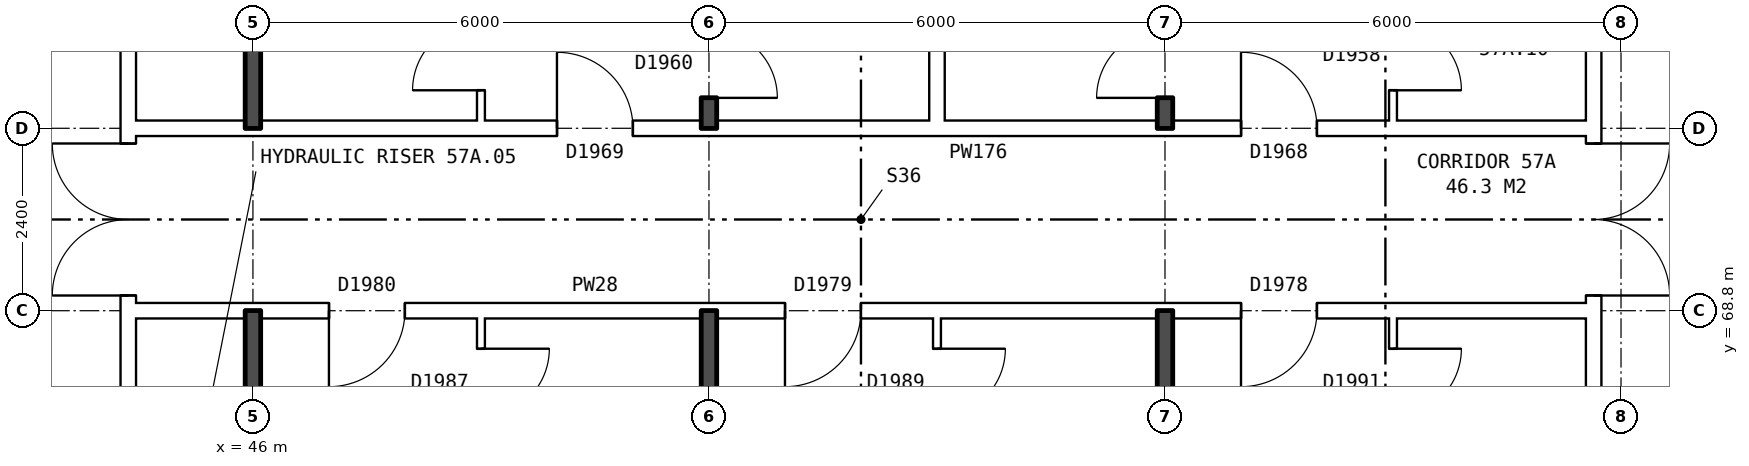
"""IFC4 building model, lengths in metres.
Left out: names, types, materials, properties, quantities, classifications, styles, units other than length and angle.
Written with IfcOpenShell. Run it as: python <this file> out.ifc"""

import sys

from ifc_helpers import new_model, si_unit, direction, frame, frame_2d, origin, place, context, subcontext, project, spatial, rectangle, extrude, element, fill, save


model = new_model("IFC4")
c1 = context("Model", 3, precision=1e-05, world=origin(), true_north=direction((0.0, 1.0)))
c2 = subcontext(c1, "Body", "Model", "MODEL_VIEW")
j1 = project(units=[si_unit("LENGTHUNIT", "METRE"), si_unit("PLANEANGLEUNIT", "RADIAN")], contexts=[c1])
p1 = place(None, origin())
s1 = spatial("IfcSite", under=j1, at=p1, CompositionType="ELEMENT")
p2 = place(p1, origin())
s2 = spatial("IfcBuilding", under=s1, at=p2, CompositionType="ELEMENT")
p3 = place(p2, frame((0.0, 0.0, 202.8)))
s3 = spatial("IfcBuildingStorey", under=s2, at=p3, CompositionType="ELEMENT", Elevation=202.8)
p4 = place(p3, frame((63.64, 63.9, 0.0), z_axis=(0.0, 0.0, 1.0), x_axis=(0.0, 1.0, 0.0)))
e1 = element("IfcWall", 1, at=p4, inside=s3, PredefinedType="PARTITIONING", context=c2, shape_type="SweptSolid", body=[
    extrude(rectangle(XDim=12.2, YDim=0.2, at=frame_2d((6.1, 0.0))), origin(), (0.0, 0.0, 1.0), 2.85),
])
p5 = place(p4, frame((5.1, 0.0, 0.0)))
e2 = element("IfcOpeningElement", 2, at=p5, cuts=e1, PredefinedType="OPENING", context=c2, shape_type="SweptSolid", body=[
    extrude(rectangle(XDim=2.0, YDim=2.1, at=frame_2d((1.0, 1.05))), frame((0.0, 0.11, 0.0), z_axis=(0.0, -1.0, 0.0), x_axis=(1.0, 0.0, 0.0)), (0.0, 0.0, 1.0), 0.22),
])
p6 = place(p3, frame((44.36, 63.9, 0.0), z_axis=(0.0, 0.0, 1.0), x_axis=(0.0, 1.0, 0.0)))
e3 = element("IfcWall", 3, at=p6, inside=s3, PredefinedType="PARTITIONING", context=c2, shape_type="SweptSolid", body=[
    extrude(rectangle(XDim=12.2, YDim=0.2, at=frame_2d((6.1, 0.0))), origin(), (0.0, 0.0, 1.0), 2.85),
])
p7 = place(p6, frame((5.1, 0.0, 0.0)))
e4 = element("IfcOpeningElement", 4, at=p7, cuts=e3, PredefinedType="OPENING", context=c2, shape_type="SweptSolid", body=[
    extrude(rectangle(XDim=2.0, YDim=2.1, at=frame_2d((1.0, 1.05))), frame((0.0, 0.11, 0.0), z_axis=(0.0, -1.0, 0.0), x_axis=(1.0, 0.0, 0.0)), (0.0, 0.0, 1.0), 0.22),
])
p8 = place(p3, frame((44.36, 68.8, 0.0), z_axis=(0.0, 0.0, 1.0), x_axis=(1.0, 0.0, 0.0)))
e5 = element("IfcWall", 5, at=p8, inside=s3, PredefinedType="PARTITIONING", context=c2, shape_type="SweptSolid", body=[
    extrude(rectangle(XDim=19.28, YDim=0.2, at=frame_2d((9.64, 0.0))), origin(), (0.0, 0.0, 1.0), 2.85),
])
p9 = place(p8, frame((14.64, 0.0, 0.0)))
e6 = element("IfcOpeningElement", 6, at=p9, cuts=e5, PredefinedType="OPENING", context=c2, shape_type="SweptSolid", body=[
    extrude(rectangle(XDim=1.0, YDim=2.1, at=frame_2d((0.5, 1.05))), frame((0.0, 0.11, 0.0), z_axis=(0.0, -1.0, 0.0), x_axis=(1.0, 0.0, 0.0)), (0.0, 0.0, 1.0), 0.22),
])
p10 = place(p8, frame((8.64, 0.0, 0.0)))
e7 = element("IfcOpeningElement", 7, at=p10, cuts=e5, PredefinedType="OPENING", context=c2, shape_type="SweptSolid", body=[
    extrude(rectangle(XDim=1.0, YDim=2.1, at=frame_2d((0.5, 1.05))), frame((0.0, 0.11, 0.0), z_axis=(0.0, -1.0, 0.0), x_axis=(1.0, 0.0, 0.0)), (0.0, 0.0, 1.0), 0.22),
])
p11 = place(p8, frame((2.64, 0.0, 0.0)))
e8 = element("IfcOpeningElement", 8, at=p11, cuts=e5, PredefinedType="OPENING", context=c2, shape_type="SweptSolid", body=[
    extrude(rectangle(XDim=1.0, YDim=2.1, at=frame_2d((0.5, 1.05))), frame((0.0, 0.11, 0.0), z_axis=(0.0, -1.0, 0.0), x_axis=(1.0, 0.0, 0.0)), (0.0, 0.0, 1.0), 0.22),
])
p12 = place(p3, frame((44.36, 71.2, 0.0), z_axis=(0.0, 0.0, 1.0), x_axis=(1.0, 0.0, 0.0)))
e9 = element("IfcWall", 9, at=p12, inside=s3, PredefinedType="PARTITIONING", context=c2, shape_type="SweptSolid", body=[
    extrude(rectangle(XDim=19.28, YDim=0.2, at=frame_2d((9.64, 0.0))), origin(), (0.0, 0.0, 1.0), 2.85),
])
p13 = place(p12, frame((14.64, 0.0, 0.0)))
e10 = element("IfcOpeningElement", 10, at=p13, cuts=e9, PredefinedType="OPENING", context=c2, shape_type="SweptSolid", body=[
    extrude(rectangle(XDim=1.0, YDim=2.1, at=frame_2d((0.5, 1.05))), frame((0.0, 0.11, 0.0), z_axis=(0.0, -1.0, 0.0), x_axis=(1.0, 0.0, 0.0)), (0.0, 0.0, 1.0), 0.22),
])
p14 = place(p12, frame((5.64, 0.0, 0.0)))
e11 = element("IfcOpeningElement", 11, at=p14, cuts=e9, PredefinedType="OPENING", context=c2, shape_type="SweptSolid", body=[
    extrude(rectangle(XDim=1.0, YDim=2.1, at=frame_2d((0.5, 1.05))), frame((0.0, 0.11, 0.0), z_axis=(0.0, -1.0, 0.0), x_axis=(1.0, 0.0, 0.0)), (0.0, 0.0, 1.0), 0.22),
])
for number, where, z_axis, x_axis in (
    (12, (46.0, 54.36, 0.0), (0.0, 0.0, 1.0), (0.0, 1.0, 0.0)),
    (13, (46.0, 71.2, 0.0), (0.0, 0.0, 1.0), (0.0, 1.0, 0.0)),
):
    element("IfcWall", number, at=place(p3, frame(where, z_axis=z_axis, x_axis=x_axis)), inside=s3, PredefinedType="SOLIDWALL", context=c2, shape_type="SweptSolid", body=[
        extrude(rectangle(XDim=14.44, YDim=0.2, at=frame_2d((7.22, 0.0))), origin(), (0.0, 0.0, 1.0), 2.85),
    ])
p15 = place(p3, frame((49.0, 54.36, 0.0), z_axis=(0.0, 0.0, 1.0), x_axis=(0.0, 1.0, 0.0)))
e14 = element("IfcWall", 14, at=p15, inside=s3, PredefinedType="PARTITIONING", context=c2, shape_type="SweptSolid", body=[
    extrude(rectangle(XDim=14.34, YDim=0.1, at=frame_2d((7.17, 0.0))), origin(), (0.0, 0.0, 1.0), 2.85),
])
p16 = place(p15, frame((4.2, 0.0, 0.0)))
e15 = element("IfcOpeningElement", 15, at=p16, cuts=e14, PredefinedType="OPENING", context=c2, shape_type="SweptSolid", body=[
    extrude(rectangle(XDim=0.9, YDim=2.1, at=frame_2d((0.45, 1.05))), frame((0.0, 0.06, 0.0), z_axis=(0.0, -1.0, 0.0), x_axis=(1.0, 0.0, 0.0)), (0.0, 0.0, 1.0), 0.12),
])
p17 = place(p15, frame((13.04, 0.0, 0.0)))
e16 = element("IfcOpeningElement", 16, at=p17, cuts=e14, PredefinedType="OPENING", context=c2, shape_type="SweptSolid", body=[
    extrude(rectangle(XDim=0.9, YDim=2.1, at=frame_2d((0.45, 1.05))), frame((0.0, 0.06, 0.0), z_axis=(0.0, -1.0, 0.0), x_axis=(1.0, 0.0, 0.0)), (0.0, 0.0, 1.0), 0.12),
])
p18 = place(p3, frame((49.0, 71.3, 0.0), z_axis=(0.0, 0.0, 1.0), x_axis=(0.0, 1.0, 0.0)))
e17 = element("IfcWall", 17, at=p18, inside=s3, PredefinedType="PARTITIONING", context=c2, shape_type="SweptSolid", body=[
    extrude(rectangle(XDim=14.34, YDim=0.1, at=frame_2d((7.17, 0.0))), origin(), (0.0, 0.0, 1.0), 2.85),
])
p19 = place(p18, frame((7.94, 0.0, 0.0)))
e18 = element("IfcOpeningElement", 18, at=p19, cuts=e17, PredefinedType="OPENING", context=c2, shape_type="SweptSolid", body=[
    extrude(rectangle(XDim=0.9, YDim=2.1, at=frame_2d((0.45, 1.05))), frame((0.0, 0.06, 0.0), z_axis=(0.0, -1.0, 0.0), x_axis=(1.0, 0.0, 0.0)), (0.0, 0.0, 1.0), 0.12),
])
p20 = place(p18, frame((0.4, 0.0, 0.0)))
e19 = element("IfcOpeningElement", 19, at=p20, cuts=e17, PredefinedType="OPENING", context=c2, shape_type="SweptSolid", body=[
    extrude(rectangle(XDim=0.9, YDim=2.1, at=frame_2d((0.45, 1.05))), frame((0.0, 0.06, 0.0), z_axis=(0.0, -1.0, 0.0), x_axis=(1.0, 0.0, 0.0)), (0.0, 0.0, 1.0), 0.12),
])
p21 = place(p3, frame((52.0, 54.36, 0.0), z_axis=(0.0, 0.0, 1.0), x_axis=(0.0, 1.0, 0.0)))
e20 = element("IfcWall", 20, at=p21, inside=s3, PredefinedType="SOLIDWALL", context=c2, shape_type="SweptSolid", body=[
    extrude(rectangle(XDim=14.44, YDim=0.2, at=frame_2d((7.22, 0.0))), origin(), (0.0, 0.0, 1.0), 2.85),
])
p22 = place(p3, frame((52.0, 71.2, 0.0), z_axis=(0.0, 0.0, 1.0), x_axis=(0.0, 1.0, 0.0)))
e21 = element("IfcWall", 21, at=p22, inside=s3, PredefinedType="SOLIDWALL", context=c2, shape_type="SweptSolid", body=[
    extrude(rectangle(XDim=14.44, YDim=0.2, at=frame_2d((7.22, 0.0))), origin(), (0.0, 0.0, 1.0), 2.85),
])
p23 = place(p22, frame((8.04, 0.0, 0.0)))
e22 = element("IfcOpeningElement", 22, at=p23, cuts=e21, PredefinedType="OPENING", context=c2, shape_type="SweptSolid", body=[
    extrude(rectangle(XDim=0.9, YDim=2.1, at=frame_2d((0.45, 1.05))), frame((0.0, 0.11, 0.0), z_axis=(0.0, -1.0, 0.0), x_axis=(1.0, 0.0, 0.0)), (0.0, 0.0, 1.0), 0.22),
])
p24 = place(p22, frame((0.4, 0.0, 0.0)))
e23 = element("IfcOpeningElement", 23, at=p24, cuts=e21, PredefinedType="OPENING", context=c2, shape_type="SweptSolid", body=[
    extrude(rectangle(XDim=0.9, YDim=2.1, at=frame_2d((0.45, 1.05))), frame((0.0, 0.11, 0.0), z_axis=(0.0, -1.0, 0.0), x_axis=(1.0, 0.0, 0.0)), (0.0, 0.0, 1.0), 0.22),
])
p25 = place(p3, frame((55.0, 54.36, 0.0), z_axis=(0.0, 0.0, 1.0), x_axis=(0.0, 1.0, 0.0)))
e24 = element("IfcWall", 24, at=p25, inside=s3, PredefinedType="PARTITIONING", context=c2, shape_type="SweptSolid", body=[
    extrude(rectangle(XDim=14.34, YDim=0.1, at=frame_2d((7.17, 0.0))), origin(), (0.0, 0.0, 1.0), 2.85),
])
p26 = place(p25, frame((7.7, 0.0, 0.0)))
e25 = element("IfcOpeningElement", 25, at=p26, cuts=e24, PredefinedType="OPENING", context=c2, shape_type="SweptSolid", body=[
    extrude(rectangle(XDim=0.9, YDim=2.1, at=frame_2d((0.45, 1.05))), frame((0.0, 0.06, 0.0), z_axis=(0.0, -1.0, 0.0), x_axis=(1.0, 0.0, 0.0)), (0.0, 0.0, 1.0), 0.12),
])
p27 = place(p25, frame((13.04, 0.0, 0.0)))
e26 = element("IfcOpeningElement", 26, at=p27, cuts=e24, PredefinedType="OPENING", context=c2, shape_type="SweptSolid", body=[
    extrude(rectangle(XDim=0.9, YDim=2.1, at=frame_2d((0.45, 1.05))), frame((0.0, 0.06, 0.0), z_axis=(0.0, -1.0, 0.0), x_axis=(1.0, 0.0, 0.0)), (0.0, 0.0, 1.0), 0.12),
])
p28 = place(p3, frame((55.0, 71.3, 0.0), z_axis=(0.0, 0.0, 1.0), x_axis=(0.0, 1.0, 0.0)))
e27 = element("IfcWall", 27, at=p28, inside=s3, PredefinedType="PARTITIONING", context=c2, shape_type="SweptSolid", body=[
    extrude(rectangle(XDim=14.34, YDim=0.2, at=frame_2d((7.17, 0.0))), origin(), (0.0, 0.0, 1.0), 2.85),
])
p29 = place(p3, frame((58.0, 54.36, 0.0), z_axis=(0.0, 0.0, 1.0), x_axis=(0.0, 1.0, 0.0)))
e28 = element("IfcWall", 28, at=p29, inside=s3, PredefinedType="SOLIDWALL", context=c2, shape_type="SweptSolid", body=[
    extrude(rectangle(XDim=14.44, YDim=0.2, at=frame_2d((7.22, 0.0))), origin(), (0.0, 0.0, 1.0), 2.85),
])
p30 = place(p3, frame((58.0, 71.2, 0.0), z_axis=(0.0, 0.0, 1.0), x_axis=(0.0, 1.0, 0.0)))
e29 = element("IfcWall", 29, at=p30, inside=s3, PredefinedType="SOLIDWALL", context=c2, shape_type="SweptSolid", body=[
    extrude(rectangle(XDim=14.44, YDim=0.2, at=frame_2d((7.22, 0.0))), origin(), (0.0, 0.0, 1.0), 2.85),
])
p31 = place(p30, frame((8.04, 0.0, 0.0)))
e30 = element("IfcOpeningElement", 30, at=p31, cuts=e29, PredefinedType="OPENING", context=c2, shape_type="SweptSolid", body=[
    extrude(rectangle(XDim=0.9, YDim=2.1, at=frame_2d((0.45, 1.05))), frame((0.0, 0.11, 0.0), z_axis=(0.0, -1.0, 0.0), x_axis=(1.0, 0.0, 0.0)), (0.0, 0.0, 1.0), 0.22),
])
p32 = place(p30, frame((0.4, 0.0, 0.0)))
e31 = element("IfcOpeningElement", 31, at=p32, cuts=e29, PredefinedType="OPENING", context=c2, shape_type="SweptSolid", body=[
    extrude(rectangle(XDim=0.9, YDim=2.1, at=frame_2d((0.45, 1.05))), frame((0.0, 0.11, 0.0), z_axis=(0.0, -1.0, 0.0), x_axis=(1.0, 0.0, 0.0)), (0.0, 0.0, 1.0), 0.22),
])
p33 = place(p3, frame((61.0, 54.36, 0.0), z_axis=(0.0, 0.0, 1.0), x_axis=(0.0, 1.0, 0.0)))
e32 = element("IfcWall", 32, at=p33, inside=s3, PredefinedType="PARTITIONING", context=c2, shape_type="SweptSolid", body=[
    extrude(rectangle(XDim=14.34, YDim=0.1, at=frame_2d((7.17, 0.0))), origin(), (0.0, 0.0, 1.0), 2.85),
])
p34 = place(p33, frame((7.7, 0.0, 0.0)))
e33 = element("IfcOpeningElement", 33, at=p34, cuts=e32, PredefinedType="OPENING", context=c2, shape_type="SweptSolid", body=[
    extrude(rectangle(XDim=0.9, YDim=2.1, at=frame_2d((0.45, 1.05))), frame((0.0, 0.06, 0.0), z_axis=(0.0, -1.0, 0.0), x_axis=(1.0, 0.0, 0.0)), (0.0, 0.0, 1.0), 0.12),
])
p35 = place(p33, frame((13.04, 0.0, 0.0)))
e34 = element("IfcOpeningElement", 34, at=p35, cuts=e32, PredefinedType="OPENING", context=c2, shape_type="SweptSolid", body=[
    extrude(rectangle(XDim=0.9, YDim=2.1, at=frame_2d((0.45, 1.05))), frame((0.0, 0.06, 0.0), z_axis=(0.0, -1.0, 0.0), x_axis=(1.0, 0.0, 0.0)), (0.0, 0.0, 1.0), 0.12),
])
p36 = place(p3, frame((61.0, 71.3, 0.0), z_axis=(0.0, 0.0, 1.0), x_axis=(0.0, 1.0, 0.0)))
e35 = element("IfcWall", 35, at=p36, inside=s3, PredefinedType="PARTITIONING", context=c2, shape_type="SweptSolid", body=[
    extrude(rectangle(XDim=14.34, YDim=0.1, at=frame_2d((7.17, 0.0))), origin(), (0.0, 0.0, 1.0), 2.85),
])
p37 = place(p36, frame((7.94, 0.0, 0.0)))
e36 = element("IfcOpeningElement", 36, at=p37, cuts=e35, PredefinedType="OPENING", context=c2, shape_type="SweptSolid", body=[
    extrude(rectangle(XDim=0.9, YDim=2.1, at=frame_2d((0.45, 1.05))), frame((0.0, 0.06, 0.0), z_axis=(0.0, -1.0, 0.0), x_axis=(1.0, 0.0, 0.0)), (0.0, 0.0, 1.0), 0.12),
])
p38 = place(p36, frame((0.4, 0.0, 0.0)))
e37 = element("IfcOpeningElement", 37, at=p38, cuts=e35, PredefinedType="OPENING", context=c2, shape_type="SweptSolid", body=[
    extrude(rectangle(XDim=0.9, YDim=2.1, at=frame_2d((0.45, 1.05))), frame((0.0, 0.06, 0.0), z_axis=(0.0, -1.0, 0.0), x_axis=(1.0, 0.0, 0.0)), (0.0, 0.0, 1.0), 0.12),
])
p39 = place(p5, frame((2.0, 0.0, 0.0), z_axis=(0.0, 0.0, 1.0), x_axis=(-1.0, 0.0, 0.0)))
e38 = element("IfcDoor", 38, at=p39, inside=s3, OperationType="DOUBLE_DOOR_SINGLE_SWING", PredefinedType="DOOR", context=c2, shape_type="SweptSolid", body=[
    extrude(rectangle(XDim=2.0, YDim=2.1, at=frame_2d((1.0, 1.05))), frame((0.0, 0.025, 0.0), z_axis=(0.0, -1.0, 0.0), x_axis=(1.0, 0.0, 0.0)), (0.0, 0.0, 1.0), 0.05),
])
fill(e2, e38)
p40 = place(p7, origin())
e39 = element("IfcDoor", 39, at=p40, inside=s3, OperationType="DOUBLE_DOOR_SINGLE_SWING", PredefinedType="DOOR", context=c2, shape_type="SweptSolid", body=[
    extrude(rectangle(XDim=2.0, YDim=2.1, at=frame_2d((1.0, 1.05))), frame((0.0, 0.025, 0.0), z_axis=(0.0, -1.0, 0.0), x_axis=(1.0, 0.0, 0.0)), (0.0, 0.0, 1.0), 0.05),
])
fill(e4, e39)
p41 = place(p9, frame((1.0, 0.0, 0.0), z_axis=(0.0, 0.0, 1.0), x_axis=(-1.0, 0.0, 0.0)))
e40 = element("IfcDoor", 40, at=p41, inside=s3, OperationType="SINGLE_SWING_RIGHT", PredefinedType="DOOR", context=c2, shape_type="SweptSolid", body=[
    extrude(rectangle(XDim=1.0, YDim=2.1, at=frame_2d((0.5, 1.05))), frame((0.0, 0.025, 0.0), z_axis=(0.0, -1.0, 0.0), x_axis=(1.0, 0.0, 0.0)), (0.0, 0.0, 1.0), 0.05),
])
fill(e6, e40)
p42 = place(p35, frame((0.9, 0.0, 0.0), z_axis=(0.0, 0.0, 1.0), x_axis=(-1.0, 0.0, 0.0)))
e41 = element("IfcDoor", 41, at=p42, inside=s3, OperationType="SINGLE_SWING_LEFT", PredefinedType="DOOR", context=c2, shape_type="SweptSolid", body=[
    extrude(rectangle(XDim=0.9, YDim=2.1, at=frame_2d((0.45, 1.05))), frame((0.0, 0.025, 0.0), z_axis=(0.0, -1.0, 0.0), x_axis=(1.0, 0.0, 0.0)), (0.0, 0.0, 1.0), 0.05),
])
fill(e34, e41)
p43 = place(p10, frame((1.0, 0.0, 0.0), z_axis=(0.0, 0.0, 1.0), x_axis=(-1.0, 0.0, 0.0)))
e42 = element("IfcDoor", 42, at=p43, inside=s3, OperationType="SINGLE_SWING_RIGHT", PredefinedType="DOOR", context=c2, shape_type="SweptSolid", body=[
    extrude(rectangle(XDim=1.0, YDim=2.1, at=frame_2d((0.5, 1.05))), frame((0.0, 0.025, 0.0), z_axis=(0.0, -1.0, 0.0), x_axis=(1.0, 0.0, 0.0)), (0.0, 0.0, 1.0), 0.05),
])
fill(e7, e42)
p44 = place(p27, frame((0.9, 0.0, 0.0), z_axis=(0.0, 0.0, 1.0), x_axis=(-1.0, 0.0, 0.0)))
e43 = element("IfcDoor", 43, at=p44, inside=s3, OperationType="SINGLE_SWING_LEFT", PredefinedType="DOOR", context=c2, shape_type="SweptSolid", body=[
    extrude(rectangle(XDim=0.9, YDim=2.1, at=frame_2d((0.45, 1.05))), frame((0.0, 0.025, 0.0), z_axis=(0.0, -1.0, 0.0), x_axis=(1.0, 0.0, 0.0)), (0.0, 0.0, 1.0), 0.05),
])
fill(e26, e43)
p45 = place(p11, frame((1.0, 0.0, 0.0), z_axis=(0.0, 0.0, 1.0), x_axis=(-1.0, 0.0, 0.0)))
e44 = element("IfcDoor", 44, at=p45, inside=s3, OperationType="SINGLE_SWING_RIGHT", PredefinedType="DOOR", context=c2, shape_type="SweptSolid", body=[
    extrude(rectangle(XDim=1.0, YDim=2.1, at=frame_2d((0.5, 1.05))), frame((0.0, 0.025, 0.0), z_axis=(0.0, -1.0, 0.0), x_axis=(1.0, 0.0, 0.0)), (0.0, 0.0, 1.0), 0.05),
])
fill(e8, e44)
p46 = place(p17, frame((0.9, 0.0, 0.0), z_axis=(0.0, 0.0, 1.0), x_axis=(-1.0, 0.0, 0.0)))
e45 = element("IfcDoor", 45, at=p46, inside=s3, OperationType="SINGLE_SWING_LEFT", PredefinedType="DOOR", context=c2, shape_type="SweptSolid", body=[
    extrude(rectangle(XDim=0.9, YDim=2.1, at=frame_2d((0.45, 1.05))), frame((0.0, 0.025, 0.0), z_axis=(0.0, -1.0, 0.0), x_axis=(1.0, 0.0, 0.0)), (0.0, 0.0, 1.0), 0.05),
])
fill(e16, e45)
p47 = place(p13, origin())
e46 = element("IfcDoor", 46, at=p47, inside=s3, OperationType="SINGLE_SWING_LEFT", PredefinedType="DOOR", context=c2, shape_type="SweptSolid", body=[
    extrude(rectangle(XDim=1.0, YDim=2.1, at=frame_2d((0.5, 1.05))), frame((0.0, 0.025, 0.0), z_axis=(0.0, -1.0, 0.0), x_axis=(1.0, 0.0, 0.0)), (0.0, 0.0, 1.0), 0.05),
])
fill(e10, e46)
p48 = place(p38, frame((0.9, 0.0, 0.0), z_axis=(0.0, 0.0, 1.0), x_axis=(-1.0, 0.0, 0.0)))
e47 = element("IfcDoor", 47, at=p48, inside=s3, OperationType="SINGLE_SWING_RIGHT", PredefinedType="DOOR", context=c2, shape_type="SweptSolid", body=[
    extrude(rectangle(XDim=0.9, YDim=2.1, at=frame_2d((0.45, 1.05))), frame((0.0, 0.025, 0.0), z_axis=(0.0, -1.0, 0.0), x_axis=(1.0, 0.0, 0.0)), (0.0, 0.0, 1.0), 0.05),
])
fill(e37, e47)
p49 = place(p32, origin())
e48 = element("IfcDoor", 48, at=p49, inside=s3, OperationType="SINGLE_SWING_LEFT", PredefinedType="DOOR", context=c2, shape_type="SweptSolid", body=[
    extrude(rectangle(XDim=0.9, YDim=2.1, at=frame_2d((0.45, 1.05))), frame((0.0, 0.025, 0.0), z_axis=(0.0, -1.0, 0.0), x_axis=(1.0, 0.0, 0.0)), (0.0, 0.0, 1.0), 0.05),
])
fill(e31, e48)
p50 = place(p14, origin())
e49 = element("IfcDoor", 49, at=p50, inside=s3, OperationType="SINGLE_SWING_LEFT", PredefinedType="DOOR", context=c2, shape_type="SweptSolid", body=[
    extrude(rectangle(XDim=1.0, YDim=2.1, at=frame_2d((0.5, 1.05))), frame((0.0, 0.025, 0.0), z_axis=(0.0, -1.0, 0.0), x_axis=(1.0, 0.0, 0.0)), (0.0, 0.0, 1.0), 0.05),
])
fill(e11, e49)
p51 = place(p24, frame((0.9, 0.0, 0.0), z_axis=(0.0, 0.0, 1.0), x_axis=(-1.0, 0.0, 0.0)))
e50 = element("IfcDoor", 50, at=p51, inside=s3, OperationType="SINGLE_SWING_RIGHT", PredefinedType="DOOR", context=c2, shape_type="SweptSolid", body=[
    extrude(rectangle(XDim=0.9, YDim=2.1, at=frame_2d((0.45, 1.05))), frame((0.0, 0.025, 0.0), z_axis=(0.0, -1.0, 0.0), x_axis=(1.0, 0.0, 0.0)), (0.0, 0.0, 1.0), 0.05),
])
fill(e23, e50)
p52 = place(p20, origin())
e51 = element("IfcDoor", 51, at=p52, inside=s3, OperationType="SINGLE_SWING_LEFT", PredefinedType="DOOR", context=c2, shape_type="SweptSolid", body=[
    extrude(rectangle(XDim=0.9, YDim=2.1, at=frame_2d((0.45, 1.05))), frame((0.0, 0.025, 0.0), z_axis=(0.0, -1.0, 0.0), x_axis=(1.0, 0.0, 0.0)), (0.0, 0.0, 1.0), 0.05),
])
fill(e19, e51)
save(model, sys.argv[1])
